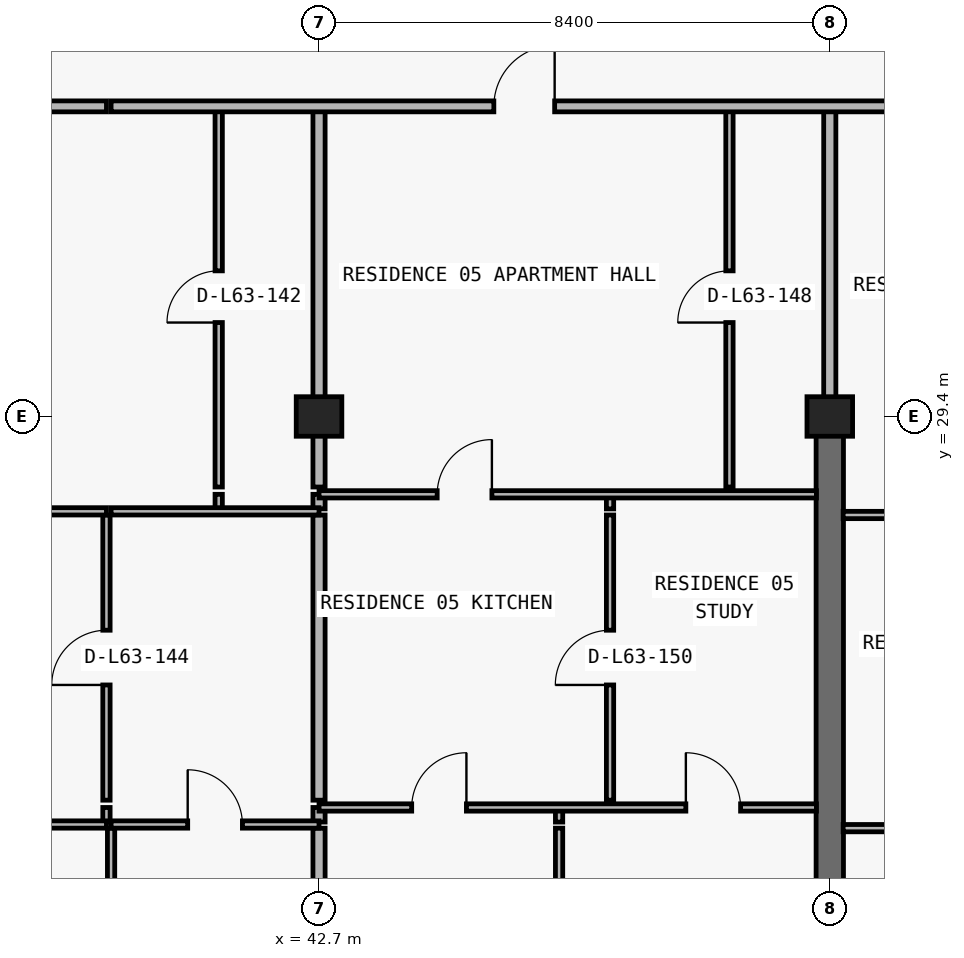
"""IFC4 building model, lengths in metres.
Left out: names, types, materials, properties, quantities, classifications, styles, units other than length and angle.
Written with IfcOpenShell. Run it as: python <this file> out.ifc"""

import sys

from ifc_helpers import new_model, si_unit, direction, frame, frame_2d, origin, origin_2d, place, context, subcontext, project, spatial, rectangle, extrude, element, fill, save


model = new_model("IFC4")
c1 = context("Model", 3, precision=1e-05, world=origin(), true_north=direction((0.0, 1.0)))
c2 = subcontext(c1, "Body", "Model", "MODEL_VIEW")
j1 = project(units=[si_unit("LENGTHUNIT", "METRE"), si_unit("PLANEANGLEUNIT", "RADIAN")], contexts=[c1])
p1 = place(None, origin())
s1 = spatial("IfcSite", under=j1, at=p1, CompositionType="ELEMENT")
p2 = place(p1, origin())
s2 = spatial("IfcBuilding", under=s1, at=p2, CompositionType="ELEMENT")
p3 = place(p2, frame((0.0, 0.0, 226.5)))
s3 = spatial("IfcBuildingStorey", under=s2, at=p3, CompositionType="ELEMENT", Elevation=226.5)
for number, where, z_axis, x_axis in (
    (1, (42.7, 29.4, 0.0), (0.0, 0.0, 1.0), (1.0, 0.0, 0.0)),
    (2, (51.1, 29.4, 0.0), (0.0, 0.0, 1.0), (1.0, 0.0, 0.0)),
):
    element("IfcColumn", number, at=place(p3, frame(where, z_axis=z_axis, x_axis=x_axis)), inside=s3, PredefinedType="COLUMN", context=c2, shape_type="SweptSolid", body=[
        extrude(rectangle(XDim=0.75, YDim=0.65, at=origin_2d()), origin(), (0.0, 0.0, 1.0), 3.05),
    ])
p4 = place(p3, frame((51.1, 20.8, 0.0), z_axis=(0.0, 0.0, 1.0), x_axis=(0.0, 1.0, 0.0)))
e3 = element("IfcWall", 3, at=p4, inside=s3, PredefinedType="SHEAR", context=c2, shape_type="SweptSolid", body=[
    extrude(rectangle(XDim=8.6, YDim=0.45, at=frame_2d((4.3, 0.0))), origin(), (0.0, 0.0, 1.0), 3.05),
])
p5 = place(p3, frame((39.204, 22.73, 0.0), z_axis=(0.0, 0.0, 1.0), x_axis=(0.0, 1.0, 0.0)))
e4 = element("IfcWall", 4, at=p5, inside=s3, PredefinedType="PARTITIONING", context=c2, shape_type="SweptSolid", body=[
    extrude(rectangle(XDim=0.24, YDim=0.12, at=frame_2d((0.12, 0.0))), origin(), (0.0, 0.0, 1.0), 3.05),
])
p6 = place(p3, frame((39.204, 23.09, 0.0), z_axis=(0.0, 0.0, 1.0), x_axis=(0.0, 1.0, 0.0)))
e5 = element("IfcWall", 5, at=p6, inside=s3, PredefinedType="PARTITIONING", context=c2, shape_type="SweptSolid", body=[
    extrude(rectangle(XDim=4.69, YDim=0.12, at=frame_2d((2.345, 0.0))), origin(), (0.0, 0.0, 1.0), 3.05),
])
p7 = place(p6, frame((1.895, 0.0, 0.0)))
e6 = element("IfcOpeningElement", 6, at=p7, cuts=e5, PredefinedType="OPENING", context=c2, shape_type="SweptSolid", body=[
    extrude(rectangle(XDim=0.9, YDim=2.15, at=frame_2d((0.45, 1.075))), frame((0.0, 0.07, 0.0), z_axis=(0.0, -1.0, 0.0), x_axis=(1.0, 0.0, 0.0)), (0.0, 0.0, 1.0), 0.14),
])
p8 = place(p3, frame((39.28, 13.34, 0.0), z_axis=(0.0, 0.0, 1.0), x_axis=(0.0, 1.0, 0.0)))
e7 = element("IfcWall", 7, at=p8, inside=s3, PredefinedType="PARTITIONING", context=c2, shape_type="SweptSolid", body=[
    extrude(rectangle(XDim=9.29, YDim=0.12, at=frame_2d((4.645, 0.0))), origin(), (0.0, 0.0, 1.0), 3.05),
])
p9 = place(p3, frame((41.05, 27.88, 0.0), z_axis=(0.0, 0.0, 1.0), x_axis=(0.0, 1.0, 0.0)))
e8 = element("IfcWall", 8, at=p9, inside=s3, PredefinedType="PARTITIONING", context=c2, shape_type="SweptSolid", body=[
    extrude(rectangle(XDim=0.24, YDim=0.12, at=frame_2d((0.12, 0.0))), origin(), (0.0, 0.0, 1.0), 3.05),
])
p10 = place(p3, frame((41.05, 28.24, 0.0), z_axis=(0.0, 0.0, 1.0), x_axis=(0.0, 1.0, 0.0)))
e9 = element("IfcWall", 9, at=p10, inside=s3, PredefinedType="PARTITIONING", context=c2, shape_type="SweptSolid", body=[
    extrude(rectangle(XDim=6.26, YDim=0.12, at=frame_2d((3.13, 0.0))), origin(), (0.0, 0.0, 1.0), 3.05),
])
p11 = place(p10, frame((2.705, 0.0, 0.0)))
e10 = element("IfcOpeningElement", 10, at=p11, cuts=e9, PredefinedType="OPENING", context=c2, shape_type="SweptSolid", body=[
    extrude(rectangle(XDim=0.85, YDim=2.1, at=frame_2d((0.425, 1.05))), frame((0.0, 0.07, 0.0), z_axis=(0.0, -1.0, 0.0), x_axis=(1.0, 0.0, 0.0)), (0.0, 0.0, 1.0), 0.14),
])
p12 = place(p3, frame((42.7, 13.34, 0.0), z_axis=(0.0, 0.0, 1.0), x_axis=(0.0, 1.0, 0.0)))
e11 = element("IfcWall", 11, at=p12, inside=s3, PredefinedType="PARTITIONING", context=c2, shape_type="SweptSolid", body=[
    extrude(rectangle(XDim=9.29, YDim=0.2, at=frame_2d((4.645, 0.0))), origin(), (0.0, 0.0, 1.0), 2.263),
])
p13 = place(p3, frame((42.7, 22.73, 0.0), z_axis=(0.0, 0.0, 1.0), x_axis=(0.0, 1.0, 0.0)))
e12 = element("IfcWall", 12, at=p13, inside=s3, PredefinedType="PARTITIONING", context=c2, shape_type="SweptSolid", body=[
    extrude(rectangle(XDim=0.24, YDim=0.2, at=frame_2d((0.12, 0.0))), origin(), (0.0, 0.0, 1.0), 2.263),
])
p14 = place(p3, frame((42.7, 23.09, 0.0), z_axis=(0.0, 0.0, 1.0), x_axis=(0.0, 1.0, 0.0)))
e13 = element("IfcWall", 13, at=p14, inside=s3, PredefinedType="PARTITIONING", context=c2, shape_type="SweptSolid", body=[
    extrude(rectangle(XDim=4.69, YDim=0.2, at=frame_2d((2.345, 0.0))), origin(), (0.0, 0.0, 1.0), 2.263),
])
p15 = place(p3, frame((42.7, 27.88, 0.0), z_axis=(0.0, 0.0, 1.0), x_axis=(0.0, 1.0, 0.0)))
e14 = element("IfcWall", 14, at=p15, inside=s3, PredefinedType="PARTITIONING", context=c2, shape_type="SweptSolid", body=[
    extrude(rectangle(XDim=0.24, YDim=0.2, at=frame_2d((0.12, 0.0))), origin(), (0.0, 0.0, 1.0), 2.263),
])
p16 = place(p3, frame((42.7, 28.24, 0.0), z_axis=(0.0, 0.0, 1.0), x_axis=(0.0, 1.0, 0.0)))
e15 = element("IfcWall", 15, at=p16, inside=s3, PredefinedType="PARTITIONING", context=c2, shape_type="SweptSolid", body=[
    extrude(rectangle(XDim=6.26, YDim=0.2, at=frame_2d((3.13, 0.0))), origin(), (0.0, 0.0, 1.0), 2.263),
])
p17 = place(p3, frame((46.648, 13.34, 0.0), z_axis=(0.0, 0.0, 1.0), x_axis=(0.0, 1.0, 0.0)))
e16 = element("IfcWall", 16, at=p17, inside=s3, PredefinedType="PARTITIONING", context=c2, shape_type="SweptSolid", body=[
    extrude(rectangle(XDim=9.29, YDim=0.12, at=frame_2d((4.645, 0.0))), origin(), (0.0, 0.0, 1.0), 3.05),
])
p18 = place(p3, frame((46.648, 22.73, 0.0), z_axis=(0.0, 0.0, 1.0), x_axis=(0.0, 1.0, 0.0)))
e17 = element("IfcWall", 17, at=p18, inside=s3, PredefinedType="PARTITIONING", context=c2, shape_type="SweptSolid", body=[
    extrude(rectangle(XDim=0.24, YDim=0.12, at=frame_2d((0.12, 0.0))), origin(), (0.0, 0.0, 1.0), 3.05),
])
p19 = place(p3, frame((47.486, 23.09, 0.0), z_axis=(0.0, 0.0, 1.0), x_axis=(0.0, 1.0, 0.0)))
e18 = element("IfcWall", 18, at=p19, inside=s3, PredefinedType="PARTITIONING", context=c2, shape_type="SweptSolid", body=[
    extrude(rectangle(XDim=4.69, YDim=0.12, at=frame_2d((2.345, 0.0))), origin(), (0.0, 0.0, 1.0), 3.05),
])
p20 = place(p19, frame((1.895, 0.0, 0.0)))
e19 = element("IfcOpeningElement", 19, at=p20, cuts=e18, PredefinedType="OPENING", context=c2, shape_type="SweptSolid", body=[
    extrude(rectangle(XDim=0.9, YDim=2.15, at=frame_2d((0.45, 1.075))), frame((0.0, 0.07, 0.0), z_axis=(0.0, -1.0, 0.0), x_axis=(1.0, 0.0, 0.0)), (0.0, 0.0, 1.0), 0.14),
])
p21 = place(p3, frame((47.486, 27.88, 0.0), z_axis=(0.0, 0.0, 1.0), x_axis=(0.0, 1.0, 0.0)))
e20 = element("IfcWall", 20, at=p21, inside=s3, PredefinedType="PARTITIONING", context=c2, shape_type="SweptSolid", body=[
    extrude(rectangle(XDim=0.24, YDim=0.12, at=frame_2d((0.12, 0.0))), origin(), (0.0, 0.0, 1.0), 3.05),
])
p22 = place(p3, frame((49.45, 28.24, 0.0), z_axis=(0.0, 0.0, 1.0), x_axis=(0.0, 1.0, 0.0)))
e21 = element("IfcWall", 21, at=p22, inside=s3, PredefinedType="PARTITIONING", context=c2, shape_type="SweptSolid", body=[
    extrude(rectangle(XDim=6.26, YDim=0.12, at=frame_2d((3.13, 0.0))), origin(), (0.0, 0.0, 1.0), 3.05),
])
p23 = place(p22, frame((2.705, 0.0, 0.0)))
e22 = element("IfcOpeningElement", 22, at=p23, cuts=e21, PredefinedType="OPENING", context=c2, shape_type="SweptSolid", body=[
    extrude(rectangle(XDim=0.85, YDim=2.1, at=frame_2d((0.425, 1.05))), frame((0.0, 0.07, 0.0), z_axis=(0.0, -1.0, 0.0), x_axis=(1.0, 0.0, 0.0)), (0.0, 0.0, 1.0), 0.14),
])
p24 = place(p3, frame((51.1, 29.405, 0.0), z_axis=(0.0, 0.0, 1.0), x_axis=(0.0, 1.0, 0.0)))
e23 = element("IfcWall", 23, at=p24, inside=s3, PredefinedType="PARTITIONING", context=c2, shape_type="SweptSolid", body=[
    extrude(rectangle(XDim=5.095, YDim=0.2, at=frame_2d((2.547, 0.0))), origin(), (0.0, 0.0, 1.0), 2.335),
])
p25 = place(p3, frame((51.32, 22.63, 0.0), z_axis=(0.0, 0.0, 1.0), x_axis=(1.0, 0.0, 0.0)))
e24 = element("IfcWall", 24, at=p25, inside=s3, PredefinedType="PARTITIONING", context=c2, shape_type="SweptSolid", body=[
    extrude(rectangle(XDim=8.18, YDim=0.12, at=frame_2d((4.09, 0.0))), origin(), (0.0, 0.0, 1.0), 3.05),
])
p26 = place(p25, frame((1.583, 0.0, 0.0)))
e25 = element("IfcOpeningElement", 25, at=p26, cuts=e24, PredefinedType="OPENING", context=c2, shape_type="SweptSolid", body=[
    extrude(rectangle(XDim=0.9, YDim=2.15, at=frame_2d((0.45, 1.075))), frame((0.0, 0.07, 0.0), z_axis=(0.0, -1.0, 0.0), x_axis=(1.0, 0.0, 0.0)), (0.0, 0.0, 1.0), 0.14),
])
p27 = place(p25, frame((5.84, 0.0, 0.0)))
e26 = element("IfcOpeningElement", 26, at=p27, cuts=e24, PredefinedType="OPENING", context=c2, shape_type="SweptSolid", body=[
    extrude(rectangle(XDim=0.9, YDim=2.15, at=frame_2d((0.45, 1.075))), frame((0.0, 0.07, 0.0), z_axis=(0.0, -1.0, 0.0), x_axis=(1.0, 0.0, 0.0)), (0.0, 0.0, 1.0), 0.14),
])
p28 = place(p3, frame((35.1, 22.69, 0.0), z_axis=(0.0, 0.0, 1.0), x_axis=(1.0, 0.0, 0.0)))
e27 = element("IfcWall", 27, at=p28, inside=s3, PredefinedType="PARTITIONING", context=c2, shape_type="SweptSolid", body=[
    extrude(rectangle(XDim=4.104, YDim=0.12, at=frame_2d((2.052, 0.0))), origin(), (0.0, 0.0, 1.0), 3.05),
])
p29 = place(p28, frame((1.602, 0.0, 0.0)))
e28 = element("IfcOpeningElement", 28, at=p29, cuts=e27, PredefinedType="OPENING", context=c2, shape_type="SweptSolid", body=[
    extrude(rectangle(XDim=0.9, YDim=2.15, at=frame_2d((0.45, 1.075))), frame((0.0, 0.07, 0.0), z_axis=(0.0, -1.0, 0.0), x_axis=(1.0, 0.0, 0.0)), (0.0, 0.0, 1.0), 0.14),
])
p30 = place(p3, frame((39.28, 22.69, 0.0), z_axis=(0.0, 0.0, 1.0), x_axis=(1.0, 0.0, 0.0)))
e29 = element("IfcWall", 29, at=p30, inside=s3, PredefinedType="PARTITIONING", context=c2, shape_type="SweptSolid", body=[
    extrude(rectangle(XDim=3.42, YDim=0.12, at=frame_2d((1.71, 0.0))), origin(), (0.0, 0.0, 1.0), 3.05),
])
p31 = place(p30, frame((1.26, 0.0, 0.0)))
e30 = element("IfcOpeningElement", 30, at=p31, cuts=e29, PredefinedType="OPENING", context=c2, shape_type="SweptSolid", body=[
    extrude(rectangle(XDim=0.9, YDim=2.15, at=frame_2d((0.45, 1.075))), frame((0.0, 0.07, 0.0), z_axis=(0.0, -1.0, 0.0), x_axis=(1.0, 0.0, 0.0)), (0.0, 0.0, 1.0), 0.14),
])
p32 = place(p3, frame((42.7, 22.97, 0.0), z_axis=(0.0, 0.0, 1.0), x_axis=(1.0, 0.0, 0.0)))
e31 = element("IfcWall", 31, at=p32, inside=s3, PredefinedType="PARTITIONING", context=c2, shape_type="SweptSolid", body=[
    extrude(rectangle(XDim=8.18, YDim=0.12, at=frame_2d((4.09, 0.0))), origin(), (0.0, 0.0, 1.0), 3.05),
])
p33 = place(p32, frame((1.524, 0.0, 0.0)))
e32 = element("IfcOpeningElement", 32, at=p33, cuts=e31, PredefinedType="OPENING", context=c2, shape_type="SweptSolid", body=[
    extrude(rectangle(XDim=0.9, YDim=2.15, at=frame_2d((0.45, 1.075))), frame((0.0, 0.07, 0.0), z_axis=(0.0, -1.0, 0.0), x_axis=(1.0, 0.0, 0.0)), (0.0, 0.0, 1.0), 0.14),
])
p34 = place(p32, frame((6.033, 0.0, 0.0)))
e33 = element("IfcOpeningElement", 33, at=p34, cuts=e31, PredefinedType="OPENING", context=c2, shape_type="SweptSolid", body=[
    extrude(rectangle(XDim=0.9, YDim=2.15, at=frame_2d((0.45, 1.075))), frame((0.0, 0.07, 0.0), z_axis=(0.0, -1.0, 0.0), x_axis=(1.0, 0.0, 0.0)), (0.0, 0.0, 1.0), 0.14),
])
p35 = place(p3, frame((51.32, 27.78, 0.0), z_axis=(0.0, 0.0, 1.0), x_axis=(1.0, 0.0, 0.0)))
e34 = element("IfcWall", 34, at=p35, inside=s3, PredefinedType="PARTITIONING", context=c2, shape_type="SweptSolid", body=[
    extrude(rectangle(XDim=8.18, YDim=0.12, at=frame_2d((4.09, 0.0))), origin(), (0.0, 0.0, 1.0), 3.05),
])
p36 = place(p35, frame((1.583, 0.0, 0.0)))
e35 = element("IfcOpeningElement", 35, at=p36, cuts=e34, PredefinedType="OPENING", context=c2, shape_type="SweptSolid", body=[
    extrude(rectangle(XDim=0.9, YDim=2.15, at=frame_2d((0.45, 1.075))), frame((0.0, 0.07, 0.0), z_axis=(0.0, -1.0, 0.0), x_axis=(1.0, 0.0, 0.0)), (0.0, 0.0, 1.0), 0.14),
])
p37 = place(p3, frame((35.1, 27.84, 0.0), z_axis=(0.0, 0.0, 1.0), x_axis=(1.0, 0.0, 0.0)))
e36 = element("IfcWall", 36, at=p37, inside=s3, PredefinedType="PARTITIONING", context=c2, shape_type="SweptSolid", body=[
    extrude(rectangle(XDim=4.104, YDim=0.12, at=frame_2d((2.052, 0.0))), origin(), (0.0, 0.0, 1.0), 3.05),
])
p38 = place(p37, frame((1.602, 0.0, 0.0)))
e37 = element("IfcOpeningElement", 37, at=p38, cuts=e36, PredefinedType="OPENING", context=c2, shape_type="SweptSolid", body=[
    extrude(rectangle(XDim=0.9, YDim=2.15, at=frame_2d((0.45, 1.075))), frame((0.0, 0.07, 0.0), z_axis=(0.0, -1.0, 0.0), x_axis=(1.0, 0.0, 0.0)), (0.0, 0.0, 1.0), 0.14),
])
p39 = place(p3, frame((39.28, 27.84, 0.0), z_axis=(0.0, 0.0, 1.0), x_axis=(1.0, 0.0, 0.0)))
e38 = element("IfcWall", 38, at=p39, inside=s3, PredefinedType="PARTITIONING", context=c2, shape_type="SweptSolid", body=[
    extrude(rectangle(XDim=3.42, YDim=0.12, at=frame_2d((1.71, 0.0))), origin(), (0.0, 0.0, 1.0), 3.05),
])
p40 = place(p3, frame((42.7, 28.12, 0.0), z_axis=(0.0, 0.0, 1.0), x_axis=(1.0, 0.0, 0.0)))
e39 = element("IfcWall", 39, at=p40, inside=s3, PredefinedType="PARTITIONING", context=c2, shape_type="SweptSolid", body=[
    extrude(rectangle(XDim=8.18, YDim=0.12, at=frame_2d((4.09, 0.0))), origin(), (0.0, 0.0, 1.0), 3.05),
])
p41 = place(p40, frame((1.943, 0.0, 0.0)))
e40 = element("IfcOpeningElement", 40, at=p41, cuts=e39, PredefinedType="OPENING", context=c2, shape_type="SweptSolid", body=[
    extrude(rectangle(XDim=0.9, YDim=2.15, at=frame_2d((0.45, 1.075))), frame((0.0, 0.07, 0.0), z_axis=(0.0, -1.0, 0.0), x_axis=(1.0, 0.0, 0.0)), (0.0, 0.0, 1.0), 0.14),
])
p42 = place(p3, frame((12.105, 34.5, 0.0), z_axis=(0.0, 0.0, 1.0), x_axis=(1.0, 0.0, 0.0)))
e41 = element("IfcWall", 41, at=p42, inside=s3, PredefinedType="PARTITIONING", context=c2, shape_type="SweptSolid", body=[
    extrude(rectangle(XDim=27.099, YDim=0.18, at=frame_2d((13.55, 0.0))), origin(), (0.0, 0.0, 1.0), 3.05),
])
p43 = place(p42, frame((1.772, 0.0, 0.0)))
e42 = element("IfcOpeningElement", 42, at=p43, cuts=e41, PredefinedType="OPENING", context=c2, shape_type="SweptSolid", body=[
    extrude(rectangle(XDim=1.0, YDim=2.2, at=frame_2d((0.5, 1.1))), frame((0.0, 0.1, 0.0), z_axis=(0.0, -1.0, 0.0), x_axis=(1.0, 0.0, 0.0)), (0.0, 0.0, 1.0), 0.2),
])
p44 = place(p42, frame((9.07, 0.0, 0.0)))
e43 = element("IfcOpeningElement", 43, at=p44, cuts=e41, PredefinedType="OPENING", context=c2, shape_type="SweptSolid", body=[
    extrude(rectangle(XDim=1.0, YDim=2.2, at=frame_2d((0.5, 1.1))), frame((0.0, 0.1, 0.0), z_axis=(0.0, -1.0, 0.0), x_axis=(1.0, 0.0, 0.0)), (0.0, 0.0, 1.0), 0.2),
])
p45 = place(p42, frame((17.47, 0.0, 0.0)))
e44 = element("IfcOpeningElement", 44, at=p45, cuts=e41, PredefinedType="OPENING", context=c2, shape_type="SweptSolid", body=[
    extrude(rectangle(XDim=1.0, YDim=2.2, at=frame_2d((0.5, 1.1))), frame((0.0, 0.1, 0.0), z_axis=(0.0, -1.0, 0.0), x_axis=(1.0, 0.0, 0.0)), (0.0, 0.0, 1.0), 0.2),
])
p46 = place(p42, frame((24.547, 0.0, 0.0)))
e45 = element("IfcOpeningElement", 45, at=p46, cuts=e41, PredefinedType="OPENING", context=c2, shape_type="SweptSolid", body=[
    extrude(rectangle(XDim=1.0, YDim=2.2, at=frame_2d((0.5, 1.1))), frame((0.0, 0.1, 0.0), z_axis=(0.0, -1.0, 0.0), x_axis=(1.0, 0.0, 0.0)), (0.0, 0.0, 1.0), 0.2),
])
p47 = place(p3, frame((39.28, 34.5, 0.0), z_axis=(0.0, 0.0, 1.0), x_axis=(1.0, 0.0, 0.0)))
e46 = element("IfcWall", 46, at=p47, inside=s3, PredefinedType="PARTITIONING", context=c2, shape_type="SweptSolid", body=[
    extrude(rectangle(XDim=26.42, YDim=0.18, at=frame_2d((13.21, 0.0))), origin(), (0.0, 0.0, 1.0), 3.05),
])
p48 = place(p47, frame((6.295, 0.0, 0.0)))
e47 = element("IfcOpeningElement", 47, at=p48, cuts=e46, PredefinedType="OPENING", context=c2, shape_type="SweptSolid", body=[
    extrude(rectangle(XDim=1.0, YDim=2.2, at=frame_2d((0.5, 1.1))), frame((0.0, 0.1, 0.0), z_axis=(0.0, -1.0, 0.0), x_axis=(1.0, 0.0, 0.0)), (0.0, 0.0, 1.0), 0.2),
])
p49 = place(p47, frame((14.695, 0.0, 0.0)))
e48 = element("IfcOpeningElement", 48, at=p49, cuts=e46, PredefinedType="OPENING", context=c2, shape_type="SweptSolid", body=[
    extrude(rectangle(XDim=1.0, YDim=2.2, at=frame_2d((0.5, 1.1))), frame((0.0, 0.1, 0.0), z_axis=(0.0, -1.0, 0.0), x_axis=(1.0, 0.0, 0.0)), (0.0, 0.0, 1.0), 0.2),
])
p50 = place(p47, frame((21.995, 0.0, 0.0)))
e49 = element("IfcOpeningElement", 49, at=p50, cuts=e46, PredefinedType="OPENING", context=c2, shape_type="SweptSolid", body=[
    extrude(rectangle(XDim=1.0, YDim=2.2, at=frame_2d((0.5, 1.1))), frame((0.0, 0.1, 0.0), z_axis=(0.0, -1.0, 0.0), x_axis=(1.0, 0.0, 0.0)), (0.0, 0.0, 1.0), 0.2),
])
p51 = place(p11, origin())
e50 = element("IfcDoor", 50, at=p51, inside=s3, OperationType="SINGLE_SWING_LEFT", PredefinedType="DOOR", context=c2, shape_type="SweptSolid", body=[
    extrude(rectangle(XDim=0.85, YDim=2.1, at=frame_2d((0.425, 1.05))), frame((0.0, 0.025, 0.0), z_axis=(0.0, -1.0, 0.0), x_axis=(1.0, 0.0, 0.0)), (0.0, 0.0, 1.0), 0.05),
])
fill(e10, e50)
p52 = place(p7, origin())
e51 = element("IfcDoor", 51, at=p52, inside=s3, OperationType="SINGLE_SWING_LEFT", PredefinedType="DOOR", context=c2, shape_type="SweptSolid", body=[
    extrude(rectangle(XDim=0.9, YDim=2.15, at=frame_2d((0.45, 1.075))), frame((0.0, 0.025, 0.0), z_axis=(0.0, -1.0, 0.0), x_axis=(1.0, 0.0, 0.0)), (0.0, 0.0, 1.0), 0.05),
])
fill(e6, e51)
p53 = place(p31, origin())
e52 = element("IfcDoor", 52, at=p53, inside=s3, OperationType="SINGLE_SWING_LEFT", PredefinedType="DOOR", context=c2, shape_type="SweptSolid", body=[
    extrude(rectangle(XDim=0.9, YDim=2.15, at=frame_2d((0.45, 1.075))), frame((0.0, 0.025, 0.0), z_axis=(0.0, -1.0, 0.0), x_axis=(1.0, 0.0, 0.0)), (0.0, 0.0, 1.0), 0.05),
])
fill(e30, e52)
p54 = place(p48, origin())
e53 = element("IfcDoor", 53, at=p54, inside=s3, OperationType="SINGLE_SWING_RIGHT", PredefinedType="DOOR", context=c2, shape_type="SweptSolid", body=[
    extrude(rectangle(XDim=1.0, YDim=2.2, at=frame_2d((0.5, 1.1))), frame((0.0, 0.025, 0.0), z_axis=(0.0, -1.0, 0.0), x_axis=(1.0, 0.0, 0.0)), (0.0, 0.0, 1.0), 0.05),
])
fill(e47, e53)
p55 = place(p23, origin())
e54 = element("IfcDoor", 54, at=p55, inside=s3, OperationType="SINGLE_SWING_LEFT", PredefinedType="DOOR", context=c2, shape_type="SweptSolid", body=[
    extrude(rectangle(XDim=0.85, YDim=2.1, at=frame_2d((0.425, 1.05))), frame((0.0, 0.025, 0.0), z_axis=(0.0, -1.0, 0.0), x_axis=(1.0, 0.0, 0.0)), (0.0, 0.0, 1.0), 0.05),
])
fill(e22, e54)
p56 = place(p41, origin())
e55 = element("IfcDoor", 55, at=p56, inside=s3, OperationType="SINGLE_SWING_RIGHT", PredefinedType="DOOR", context=c2, shape_type="SweptSolid", body=[
    extrude(rectangle(XDim=0.9, YDim=2.15, at=frame_2d((0.45, 1.075))), frame((0.0, 0.025, 0.0), z_axis=(0.0, -1.0, 0.0), x_axis=(1.0, 0.0, 0.0)), (0.0, 0.0, 1.0), 0.05),
])
fill(e40, e55)
p57 = place(p20, origin())
e56 = element("IfcDoor", 56, at=p57, inside=s3, OperationType="SINGLE_SWING_LEFT", PredefinedType="DOOR", context=c2, shape_type="SweptSolid", body=[
    extrude(rectangle(XDim=0.9, YDim=2.15, at=frame_2d((0.45, 1.075))), frame((0.0, 0.025, 0.0), z_axis=(0.0, -1.0, 0.0), x_axis=(1.0, 0.0, 0.0)), (0.0, 0.0, 1.0), 0.05),
])
fill(e19, e56)
p58 = place(p33, origin())
e57 = element("IfcDoor", 57, at=p58, inside=s3, OperationType="SINGLE_SWING_RIGHT", PredefinedType="DOOR", context=c2, shape_type="SweptSolid", body=[
    extrude(rectangle(XDim=0.9, YDim=2.15, at=frame_2d((0.45, 1.075))), frame((0.0, 0.025, 0.0), z_axis=(0.0, -1.0, 0.0), x_axis=(1.0, 0.0, 0.0)), (0.0, 0.0, 1.0), 0.05),
])
fill(e32, e57)
p59 = place(p34, origin())
e58 = element("IfcDoor", 58, at=p59, inside=s3, OperationType="SINGLE_SWING_LEFT", PredefinedType="DOOR", context=c2, shape_type="SweptSolid", body=[
    extrude(rectangle(XDim=0.9, YDim=2.15, at=frame_2d((0.45, 1.075))), frame((0.0, 0.025, 0.0), z_axis=(0.0, -1.0, 0.0), x_axis=(1.0, 0.0, 0.0)), (0.0, 0.0, 1.0), 0.05),
])
fill(e33, e58)
save(model, sys.argv[1])
